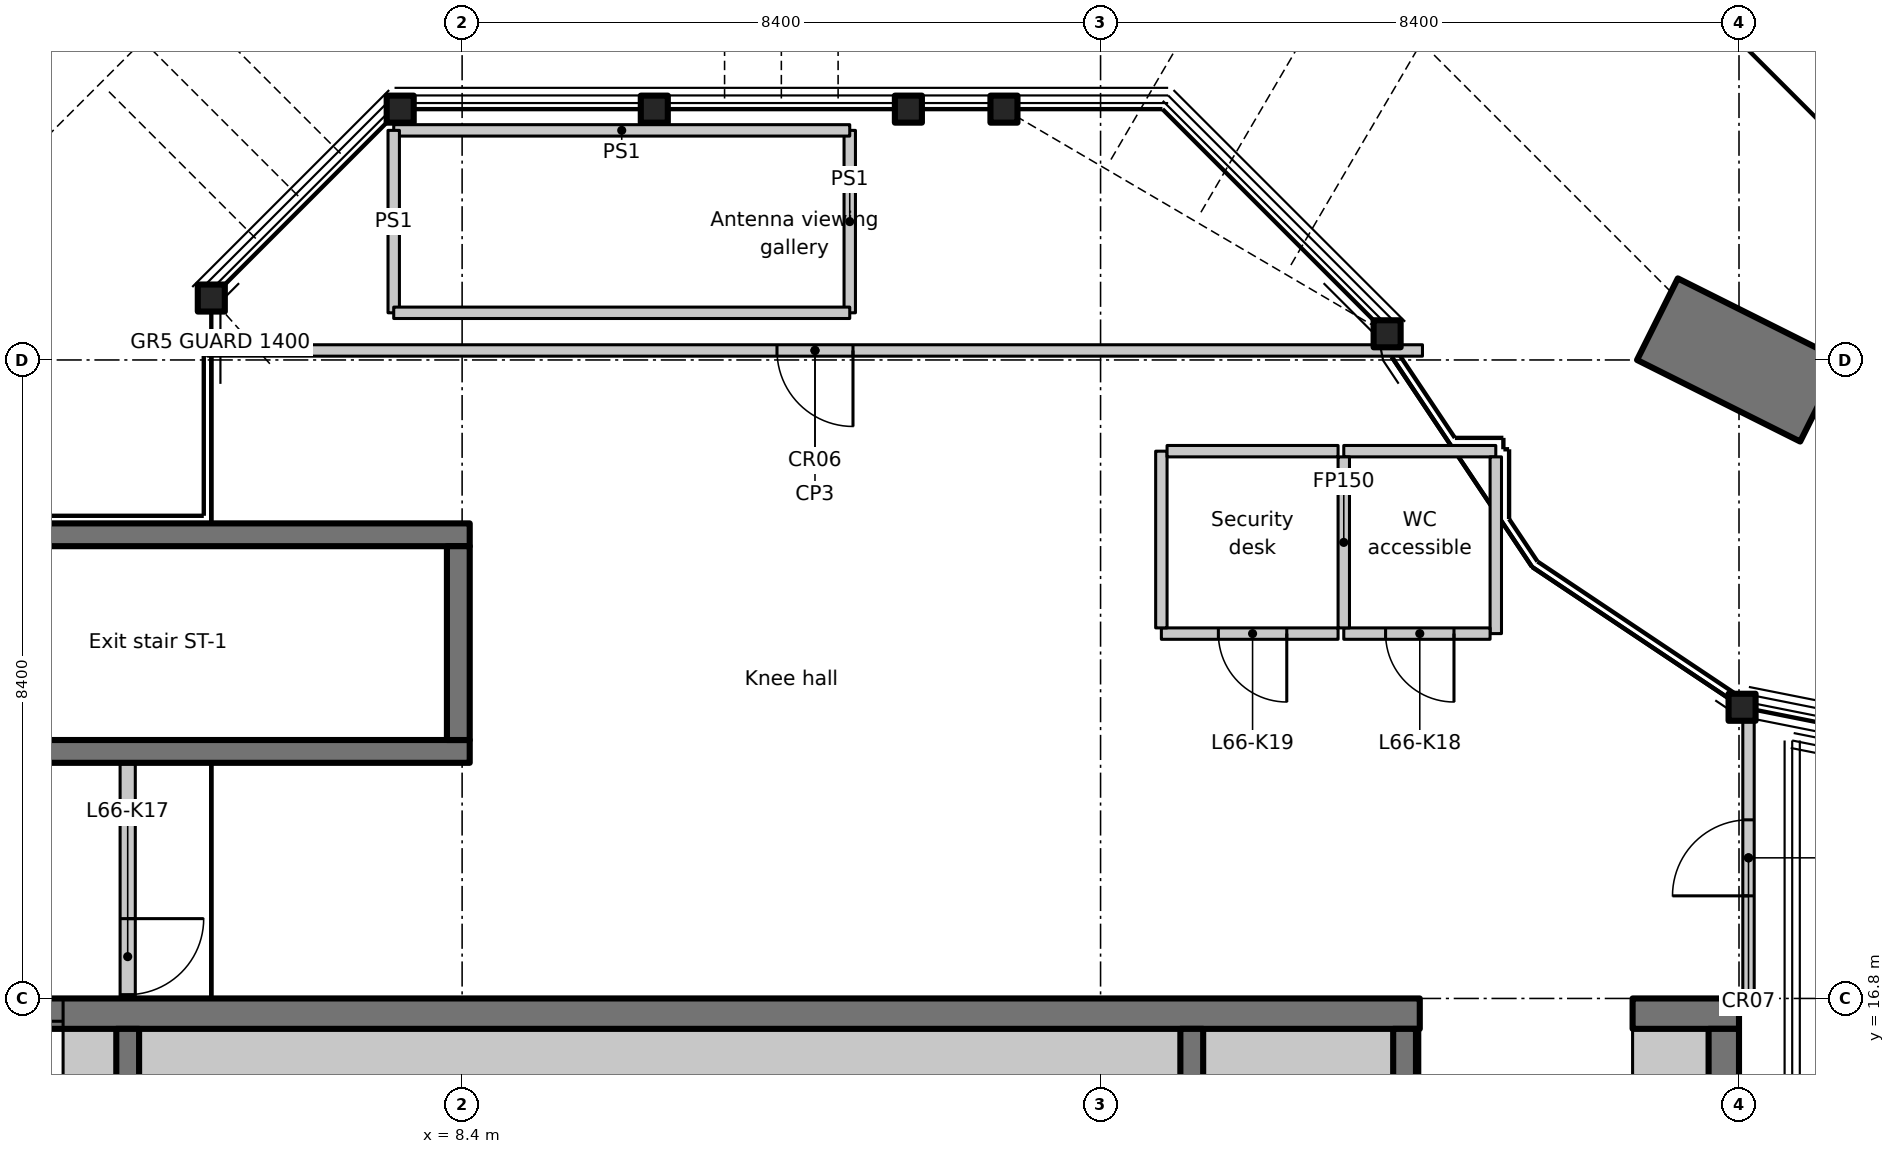
"""IFC4 building model, lengths in metres.
Left out: names, types, materials, properties, quantities, classifications, styles, units other than length and angle.
Written with IfcOpenShell. Run it as: python <this file> out.ifc"""

import sys

from ifc_helpers import new_model, si_unit, direction, frame, frame_2d, origin, origin_2d, place, context, subcontext, project, spatial, rectangle, hollow_circle, extrude, element, fill, save


model = new_model("IFC4")
c1 = context("Model", 3, precision=1e-05, world=origin(), true_north=direction((0.0, 1.0)))
c2 = subcontext(c1, "Body", "Model", "MODEL_VIEW")
j1 = project(units=[si_unit("LENGTHUNIT", "METRE"), si_unit("PLANEANGLEUNIT", "RADIAN")], contexts=[c1])
p1 = place(None, origin())
s1 = spatial("IfcSite", under=j1, at=p1, CompositionType="ELEMENT")
p2 = place(p1, origin())
s2 = spatial("IfcBuilding", under=s1, at=p2, CompositionType="ELEMENT")
p3 = place(p2, frame((0.0, 0.0, 264.2)))
s3 = spatial("IfcBuildingStorey", under=s2, at=p3, CompositionType="ELEMENT", Elevation=264.2)
p4 = place(p3, frame((26.273, 24.663, 0.0), z_axis=(0.0, 0.0, 1.0), x_axis=(-0.894427191, 0.4472135955, 0.0)))
e1 = element("IfcWall", 1, at=p4, inside=s3, PredefinedType="SOLIDWALL", context=c2, shape_type="SweptSolid", body=[
    extrude(rectangle(XDim=2.4, YDim=1.2, at=frame_2d((1.2, 0.0))), origin(), (0.0, 0.0, 1.0), 4.7),
])
for number, where, z_axis, x_axis in (
    (2, (5.1, 26.015, 0.0), (0.0, 0.0, 1.0), (1.0, 0.0, 0.0)),
    (3, (7.585, 28.5, 0.0), (0.0, 0.0, 1.0), (1.0, 0.0, 0.0)),
    (4, (10.928, 28.5, 0.0), (0.0, 0.0, 1.0), (1.0, 0.0, 0.0)),
    (5, (14.271, 28.5, 0.0), (0.0, 0.0, 1.0), (1.0, 0.0, 0.0)),
    (6, (15.529, 28.5, 0.0), (0.0, 0.0, 1.0), (1.0, 0.0, 0.0)),
    (7, (20.57, 25.544, 0.0), (0.0, 0.0, 1.0), (1.0, 0.0, 0.0)),
    (8, (25.24, 20.631, 0.0), (0.0, 0.0, 1.0), (1.0, 0.0, 0.0)),
):
    element("IfcColumn", number, at=place(p3, frame(where, z_axis=z_axis, x_axis=x_axis)), inside=s3, PredefinedType="COLUMN", context=c2, shape_type="SweptSolid", body=[
        extrude(hollow_circle(Radius=0.178, WallThickness=0.012, at=origin_2d()), origin(), (0.0, 0.0, 1.0), 4.7),
    ])
p5 = place(p3, frame((0.198, 16.6, 0.0), z_axis=(0.0, 0.0, 1.0), x_axis=(1.0, 0.0, 0.0)))
e9 = element("IfcWall", 9, at=p5, inside=s3, PredefinedType="SHEAR", context=c2, shape_type="SweptSolid", body=[
    extrude(rectangle(XDim=20.802, YDim=0.4, at=frame_2d((10.401, 0.0))), origin(), (0.0, 0.0, 1.0), 4.7),
])
p6 = place(p5, frame((1.852, 0.0, 0.0)))
e10 = element("IfcOpeningElement", 10, at=p6, cuts=e9, PredefinedType="OPENING", context=c2, shape_type="SweptSolid", body=[
    extrude(rectangle(XDim=1.1, YDim=2.3, at=frame_2d((0.55, 1.15))), frame((0.0, 0.21, 0.0), z_axis=(0.0, -1.0, 0.0), x_axis=(1.0, 0.0, 0.0)), (0.0, 0.0, 1.0), 0.42),
])
p7 = place(p3, frame((23.8, 16.6, 0.0), z_axis=(0.0, 0.0, 1.0), x_axis=(1.0, 0.0, 0.0)))
e11 = element("IfcWall", 11, at=p7, inside=s3, PredefinedType="SHEAR", context=c2, shape_type="SweptSolid", body=[
    extrude(rectangle(XDim=1.4, YDim=0.4, at=frame_2d((0.7, 0.0))), origin(), (0.0, 0.0, 1.0), 4.7),
])
p8 = place(p3, frame((25.0, 12.6, 0.0), z_axis=(0.0, 0.0, 1.0), x_axis=(0.0, 1.0, 0.0)))
e12 = element("IfcWall", 12, at=p8, inside=s3, PredefinedType="SHEAR", context=c2, shape_type="SweptSolid", body=[
    extrude(rectangle(XDim=3.8, YDim=0.4, at=frame_2d((1.9, 0.0))), origin(), (0.0, 0.0, 1.0), 4.7),
])
p9 = place(p3, frame((23.8, 16.0, 0.0), z_axis=(0.0, 0.0, 1.0), x_axis=(1.0, 0.0, 0.0)))
e13 = element("IfcWall", 13, at=p9, inside=s3, PredefinedType="PARTITIONING", context=c2, shape_type="SweptSolid", body=[
    extrude(rectangle(XDim=1.0, YDim=0.8, at=frame_2d((0.5, 0.0))), origin(), (0.0, 0.0, 1.0), 4.7),
])
for number, where, z_axis, x_axis in (
    (14, (4.0, 12.95, 0.0), (0.0, 0.0, 1.0), (0.0, 1.0, 0.0)),
    (15, (18.0, 12.95, 0.0), (0.0, 0.0, 1.0), (0.0, 1.0, 0.0)),
    (16, (20.8, 12.95, 0.0), (0.0, 0.0, 1.0), (0.0, 1.0, 0.0)),
):
    element("IfcWall", number, at=place(p3, frame(where, z_axis=z_axis, x_axis=x_axis)), inside=s3, PredefinedType="SHEAR", context=c2, shape_type="SweptSolid", body=[
        extrude(rectangle(XDim=3.45, YDim=0.3, at=frame_2d((1.725, 0.0))), origin(), (0.0, 0.0, 1.0), 4.7),
    ])
p10 = place(p3, frame((8.5, 20.05, 0.0), z_axis=(0.0, 0.0, 1.0), x_axis=(-1.0, 0.0, 0.0)))
e17 = element("IfcWall", 17, at=p10, inside=s3, PredefinedType="SHEAR", context=c2, shape_type="SweptSolid", body=[
    extrude(rectangle(XDim=8.2, YDim=0.3, at=frame_2d((4.1, 0.0))), origin(), (0.0, 0.0, 1.0), 4.7),
])
p11 = place(p10, frame((6.8, 0.0, 0.0)))
e18 = element("IfcOpeningElement", 18, at=p11, cuts=e17, PredefinedType="OPENING", context=c2, shape_type="SweptSolid", body=[
    extrude(rectangle(XDim=1.0, YDim=2.1, at=frame_2d((0.5, 1.05))), frame((0.0, 0.16, 0.0), z_axis=(0.0, -1.0, 0.0), x_axis=(1.0, 0.0, 0.0)), (0.0, 0.0, 1.0), 0.32),
])
p12 = place(p3, frame((0.3, 22.9, 0.0), z_axis=(0.0, 0.0, 1.0), x_axis=(1.0, 0.0, 0.0)))
e19 = element("IfcWall", 19, at=p12, inside=s3, PredefinedType="SHEAR", context=c2, shape_type="SweptSolid", body=[
    extrude(rectangle(XDim=8.2, YDim=0.3, at=frame_2d((4.1, 0.0))), origin(), (0.0, 0.0, 1.0), 4.7),
])
p13 = place(p3, frame((8.35, 20.2, 0.0), z_axis=(0.0, 0.0, 1.0), x_axis=(0.0, 1.0, 0.0)))
e20 = element("IfcWall", 20, at=p13, inside=s3, PredefinedType="SHEAR", context=c2, shape_type="SweptSolid", body=[
    extrude(rectangle(XDim=2.55, YDim=0.3, at=frame_2d((1.275, 0.0))), origin(), (0.0, 0.0, 1.0), 4.7),
])
p14 = place(p3, frame((4.0, 19.888, 0.0), z_axis=(0.0, 0.0, 1.0), x_axis=(0.0, -1.0, 0.0)))
e21 = element("IfcWall", 21, at=p14, inside=s3, PredefinedType="PARTITIONING", context=c2, shape_type="SweptSolid", body=[
    extrude(rectangle(XDim=3.076, YDim=0.2, at=frame_2d((1.538, 0.0))), origin(), (0.0, 0.0, 1.0), 4.7),
])
p15 = place(p14, frame((2.038, 0.0, 0.0)))
e22 = element("IfcOpeningElement", 22, at=p15, cuts=e21, PredefinedType="OPENING", context=c2, shape_type="SweptSolid", body=[
    extrude(rectangle(XDim=1.0, YDim=2.1, at=frame_2d((0.5, 1.05))), frame((0.0, 0.11, 0.0), z_axis=(0.0, -1.0, 0.0), x_axis=(1.0, 0.0, 0.0)), (0.0, 0.0, 1.0), 0.22),
])
p16 = place(p3, frame((20.0, 24.0, 0.0), z_axis=(0.0, 0.0, 1.0), x_axis=(1.0, 0.0, 0.0)))
e23 = element("IfcWall", 23, at=p16, inside=s3, PredefinedType="PARTITIONING", context=c2, shape_type="SweptSolid", body=[
    extrude(rectangle(XDim=2.0, YDim=0.15, at=frame_2d((1.0, 0.0))), origin(), (0.0, 0.0, 1.0), 4.7),
])
p17 = place(p3, frame((22.0, 23.925, 0.0), z_axis=(0.0, 0.0, 1.0), x_axis=(0.0, -1.0, 0.0)))
e24 = element("IfcWall", 24, at=p17, inside=s3, PredefinedType="PARTITIONING", context=c2, shape_type="SweptSolid", body=[
    extrude(rectangle(XDim=2.325, YDim=0.15, at=frame_2d((1.163, 0.0))), origin(), (0.0, 0.0, 1.0), 4.7),
])
p18 = place(p3, frame((21.925, 21.6, 0.0), z_axis=(0.0, 0.0, 1.0), x_axis=(-1.0, 0.0, 0.0)))
e25 = element("IfcWall", 25, at=p18, inside=s3, PredefinedType="PARTITIONING", context=c2, shape_type="SweptSolid", body=[
    extrude(rectangle(XDim=1.925, YDim=0.15, at=frame_2d((0.962, 0.0))), origin(), (0.0, 0.0, 1.0), 4.7),
])
p19 = place(p18, frame((0.475, 0.0, 0.0)))
e26 = element("IfcOpeningElement", 26, at=p19, cuts=e25, PredefinedType="OPENING", context=c2, shape_type="SweptSolid", body=[
    extrude(rectangle(XDim=0.9, YDim=2.1, at=frame_2d((0.45, 1.05))), frame((0.0, 0.085, 0.0), z_axis=(0.0, -1.0, 0.0), x_axis=(1.0, 0.0, 0.0)), (0.0, 0.0, 1.0), 0.17),
])
p20 = place(p3, frame((20.0, 21.675, 0.0), z_axis=(0.0, 0.0, 1.0), x_axis=(0.0, 1.0, 0.0)))
e27 = element("IfcWall", 27, at=p20, inside=s3, PredefinedType="PARTITIONING", context=c2, shape_type="SweptSolid", body=[
    extrude(rectangle(XDim=2.25, YDim=0.15, at=frame_2d((1.125, 0.0))), origin(), (0.0, 0.0, 1.0), 4.7),
])
p21 = place(p3, frame((19.925, 21.6, 0.0), z_axis=(0.0, 0.0, 1.0), x_axis=(-1.0, 0.0, 0.0)))
e28 = element("IfcWall", 28, at=p21, inside=s3, PredefinedType="PARTITIONING", context=c2, shape_type="SweptSolid", body=[
    extrude(rectangle(XDim=2.325, YDim=0.15, at=frame_2d((1.163, 0.0))), origin(), (0.0, 0.0, 1.0), 4.7),
])
p22 = place(p21, frame((0.675, 0.0, 0.0)))
e29 = element("IfcOpeningElement", 29, at=p22, cuts=e28, PredefinedType="OPENING", context=c2, shape_type="SweptSolid", body=[
    extrude(rectangle(XDim=0.9, YDim=2.1, at=frame_2d((0.45, 1.05))), frame((0.0, 0.085, 0.0), z_axis=(0.0, -1.0, 0.0), x_axis=(1.0, 0.0, 0.0)), (0.0, 0.0, 1.0), 0.17),
])
p23 = place(p3, frame((17.6, 21.675, 0.0), z_axis=(0.0, 0.0, 1.0), x_axis=(0.0, 1.0, 0.0)))
e30 = element("IfcWall", 30, at=p23, inside=s3, PredefinedType="PARTITIONING", context=c2, shape_type="SweptSolid", body=[
    extrude(rectangle(XDim=2.325, YDim=0.15, at=frame_2d((1.163, 0.0))), origin(), (0.0, 0.0, 1.0), 4.7),
])
p24 = place(p3, frame((17.675, 24.0, 0.0), z_axis=(0.0, 0.0, 1.0), x_axis=(1.0, 0.0, 0.0)))
e31 = element("IfcWall", 31, at=p24, inside=s3, PredefinedType="PARTITIONING", context=c2, shape_type="SweptSolid", body=[
    extrude(rectangle(XDim=2.25, YDim=0.15, at=frame_2d((1.125, 0.0))), origin(), (0.0, 0.0, 1.0), 4.7),
])
p25 = place(p3, frame((3.15, 16.0, 0.0), z_axis=(0.0, 0.0, 1.0), x_axis=(1.0, 0.0, 0.0)))
e32 = element("IfcWall", 32, at=p25, inside=s3, PredefinedType="PARTITIONING", context=c2, shape_type="SweptSolid", body=[
    extrude(rectangle(XDim=0.7, YDim=0.8, at=frame_2d((0.35, 0.0))), origin(), (0.0, 0.0, 1.0), 4.7),
])
p26 = place(p3, frame((4.15, 16.0, 0.0), z_axis=(0.0, 0.0, 1.0), x_axis=(1.0, 0.0, 0.0)))
e33 = element("IfcWall", 33, at=p26, inside=s3, PredefinedType="PARTITIONING", context=c2, shape_type="SweptSolid", body=[
    extrude(rectangle(XDim=13.7, YDim=0.8, at=frame_2d((6.85, 0.0))), origin(), (0.0, 0.0, 1.0), 4.7),
])
p27 = place(p3, frame((18.15, 16.0, 0.0), z_axis=(0.0, 0.0, 1.0), x_axis=(1.0, 0.0, 0.0)))
e34 = element("IfcWall", 34, at=p27, inside=s3, PredefinedType="PARTITIONING", context=c2, shape_type="SweptSolid", body=[
    extrude(rectangle(XDim=2.5, YDim=0.8, at=frame_2d((1.25, 0.0))), origin(), (0.0, 0.0, 1.0), 4.7),
])
p28 = place(p3, frame((20.95, 16.0, 0.0), z_axis=(0.0, 0.0, 1.0), x_axis=(1.0, 0.0, 0.0)))
e35 = element("IfcWall", 35, at=p28, inside=s3, PredefinedType="PARTITIONING", context=c2, shape_type="SweptSolid", body=[
    extrude(rectangle(XDim=0.05, YDim=0.8, at=frame_2d((0.025, 0.0))), origin(), (0.0, 0.0, 1.0), 4.7),
])
p29 = place(p3, frame((21.035, 25.325, 0.0), z_axis=(0.0, 0.0, 1.0), x_axis=(-1.0, 0.0, 0.0)))
e36 = element("IfcWall", 36, at=p29, inside=s3, PredefinedType="PARTITIONING", context=c2, shape_type="SweptSolid", body=[
    extrude(rectangle(XDim=15.985, YDim=0.15, at=frame_2d((7.993, 0.0))), origin(), (0.0, 0.0, 1.0), 4.7),
])
p30 = place(p29, frame((7.493, 0.0, 0.0)))
e37 = element("IfcOpeningElement", 37, at=p30, cuts=e36, PredefinedType="OPENING", context=c2, shape_type="SweptSolid", body=[
    extrude(rectangle(XDim=1.0, YDim=2.1, at=frame_2d((0.5, 1.05))), frame((0.0, 0.085, 0.0), z_axis=(0.0, -1.0, 0.0), x_axis=(1.0, 0.0, 0.0)), (0.0, 0.0, 1.0), 0.17),
])
p31 = place(p3, frame((25.325, 16.6, 0.0), z_axis=(0.0, 0.0, 1.0), x_axis=(0.0, 1.0, 0.0)))
e38 = element("IfcWall", 38, at=p31, inside=s3, PredefinedType="PARTITIONING", context=c2, shape_type="SweptSolid", body=[
    extrude(rectangle(XDim=4.1, YDim=0.15, at=frame_2d((2.05, 0.0))), origin(), (0.0, 0.0, 1.0), 4.7),
])
p32 = place(p31, frame((1.55, 0.0, 0.0)))
e39 = element("IfcOpeningElement", 39, at=p32, cuts=e38, PredefinedType="OPENING", context=c2, shape_type="SweptSolid", body=[
    extrude(rectangle(XDim=1.0, YDim=2.1, at=frame_2d((0.5, 1.05))), frame((0.0, 0.085, 0.0), z_axis=(0.0, -1.0, 0.0), x_axis=(1.0, 0.0, 0.0)), (0.0, 0.0, 1.0), 0.17),
])
p33 = place(p6, origin())
e40 = element("IfcDoor", 40, at=p33, inside=s3, OperationType="SLIDING_TO_LEFT", PredefinedType="DOOR", context=c2, shape_type="SweptSolid", body=[
    extrude(rectangle(XDim=1.1, YDim=2.3, at=frame_2d((0.55, 1.15))), frame((0.0, 0.025, 0.0), z_axis=(0.0, -1.0, 0.0), x_axis=(1.0, 0.0, 0.0)), (0.0, 0.0, 1.0), 0.05),
])
fill(e10, e40)
p34 = place(p15, origin())
e41 = element("IfcDoor", 41, at=p34, inside=s3, OperationType="SINGLE_SWING_LEFT", PredefinedType="DOOR", context=c2, shape_type="SweptSolid", body=[
    extrude(rectangle(XDim=1.0, YDim=2.1, at=frame_2d((0.5, 1.05))), frame((0.0, 0.025, 0.0), z_axis=(0.0, -1.0, 0.0), x_axis=(1.0, 0.0, 0.0)), (0.0, 0.0, 1.0), 0.05),
])
fill(e22, e41)
p35 = place(p19, origin())
e42 = element("IfcDoor", 42, at=p35, inside=s3, OperationType="SINGLE_SWING_RIGHT", PredefinedType="DOOR", context=c2, shape_type="SweptSolid", body=[
    extrude(rectangle(XDim=0.9, YDim=2.1, at=frame_2d((0.45, 1.05))), frame((0.0, 0.025, 0.0), z_axis=(0.0, -1.0, 0.0), x_axis=(1.0, 0.0, 0.0)), (0.0, 0.0, 1.0), 0.05),
])
fill(e26, e42)
p36 = place(p22, origin())
e43 = element("IfcDoor", 43, at=p36, inside=s3, OperationType="SINGLE_SWING_LEFT", PredefinedType="DOOR", context=c2, shape_type="SweptSolid", body=[
    extrude(rectangle(XDim=0.9, YDim=2.1, at=frame_2d((0.45, 1.05))), frame((0.0, 0.025, 0.0), z_axis=(0.0, -1.0, 0.0), x_axis=(1.0, 0.0, 0.0)), (0.0, 0.0, 1.0), 0.05),
])
fill(e29, e43)
p37 = place(p30, origin())
e44 = element("IfcDoor", 44, at=p37, inside=s3, OperationType="SINGLE_SWING_LEFT", PredefinedType="DOOR", context=c2, shape_type="SweptSolid", body=[
    extrude(rectangle(XDim=1.0, YDim=2.1, at=frame_2d((0.5, 1.05))), frame((0.0, 0.025, 0.0), z_axis=(0.0, -1.0, 0.0), x_axis=(1.0, 0.0, 0.0)), (0.0, 0.0, 1.0), 0.05),
])
fill(e37, e44)
p38 = place(p32, origin())
e45 = element("IfcDoor", 45, at=p38, inside=s3, OperationType="SINGLE_SWING_LEFT", PredefinedType="DOOR", context=c2, shape_type="SweptSolid", body=[
    extrude(rectangle(XDim=1.0, YDim=2.1, at=frame_2d((0.5, 1.05))), frame((0.0, 0.025, 0.0), z_axis=(0.0, -1.0, 0.0), x_axis=(1.0, 0.0, 0.0)), (0.0, 0.0, 1.0), 0.05),
])
fill(e39, e45)
save(model, sys.argv[1])
